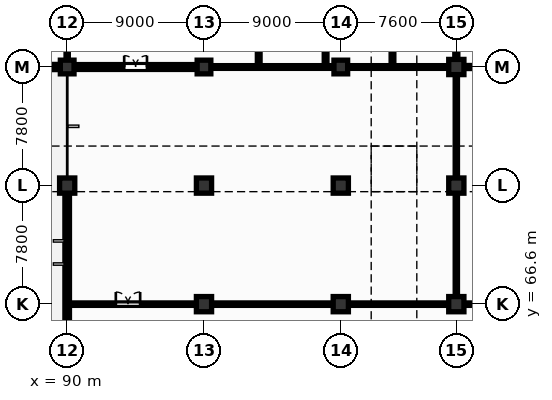
"""IFC4 building model, lengths in metres.
Left out: names, types, materials, properties, quantities, classifications, styles, units other than length and angle.
Written with IfcOpenShell. Run it as: python <this file> out.ifc"""

import sys

from ifc_helpers import new_model, si_unit, direction, frame, frame_2d, origin, origin_2d, place, context, subcontext, project, spatial, rectangle, extrude, element, fill, save


model = new_model("IFC4")
c1 = context("Model", 3, precision=1e-05, world=origin(), true_north=direction((0.0, 1.0)))
c2 = subcontext(c1, "Body", "Model", "MODEL_VIEW")
j1 = project(units=[si_unit("LENGTHUNIT", "METRE"), si_unit("PLANEANGLEUNIT", "RADIAN")], contexts=[c1])
p1 = place(None, origin())
s1 = spatial("IfcSite", under=j1, at=p1, CompositionType="ELEMENT")
p2 = place(p1, origin())
s2 = spatial("IfcBuilding", under=s1, at=p2, CompositionType="ELEMENT")
p3 = place(p2, origin())
s3 = spatial("IfcBuildingStorey", under=s2, at=p3, CompositionType="ELEMENT", Elevation=0.0)
p4 = place(p3, frame((90.0, 74.4, 0.0), z_axis=(0.0, 0.0, 1.0), x_axis=(1.0, 0.0, 0.0)))
e1 = element("IfcColumn", 1, at=p4, inside=s3, PredefinedType="COLUMN", context=c2, shape_type="SweptSolid", body=[
    extrude(rectangle(XDim=1.0, YDim=1.0, at=origin_2d()), origin(), (0.0, 0.0, 1.0), 5.1),
])
p5 = place(p3, frame((90.0, 82.2, 0.0), z_axis=(0.0, 0.0, 1.0), x_axis=(1.0, 0.0, 0.0)))
e2 = element("IfcColumn", 2, at=p5, inside=s3, PredefinedType="COLUMN", context=c2, shape_type="SweptSolid", body=[
    extrude(rectangle(XDim=0.9, YDim=0.9, at=origin_2d()), origin(), (0.0, 0.0, 1.0), 5.1),
])
for number, where, z_axis, x_axis in (
    (3, (99.0, 66.6, 0.0), (0.0, 0.0, 1.0), (1.0, 0.0, 0.0)),
    (4, (99.0, 74.4, 0.0), (0.0, 0.0, 1.0), (1.0, 0.0, 0.0)),
):
    element("IfcColumn", number, at=place(p3, frame(where, z_axis=z_axis, x_axis=x_axis)), inside=s3, PredefinedType="COLUMN", context=c2, shape_type="SweptSolid", body=[
        extrude(rectangle(XDim=1.0, YDim=1.0, at=origin_2d()), origin(), (0.0, 0.0, 1.0), 5.1),
    ])
p6 = place(p3, frame((99.0, 82.2, 0.0), z_axis=(0.0, 0.0, 1.0), x_axis=(1.0, 0.0, 0.0)))
e5 = element("IfcColumn", 5, at=p6, inside=s3, PredefinedType="COLUMN", context=c2, shape_type="SweptSolid", body=[
    extrude(rectangle(XDim=0.9, YDim=0.9, at=origin_2d()), origin(), (0.0, 0.0, 1.0), 5.1),
])
for number, where, z_axis, x_axis in (
    (6, (108.0, 66.6, 0.0), (0.0, 0.0, 1.0), (1.0, 0.0, 0.0)),
    (7, (108.0, 74.4, 0.0), (0.0, 0.0, 1.0), (1.0, 0.0, 0.0)),
):
    element("IfcColumn", number, at=place(p3, frame(where, z_axis=z_axis, x_axis=x_axis)), inside=s3, PredefinedType="COLUMN", context=c2, shape_type="SweptSolid", body=[
        extrude(rectangle(XDim=1.0, YDim=1.0, at=origin_2d()), origin(), (0.0, 0.0, 1.0), 5.1),
    ])
p7 = place(p3, frame((108.0, 82.2, 0.0), z_axis=(0.0, 0.0, 1.0), x_axis=(1.0, 0.0, 0.0)))
e8 = element("IfcColumn", 8, at=p7, inside=s3, PredefinedType="COLUMN", context=c2, shape_type="SweptSolid", body=[
    extrude(rectangle(XDim=0.9, YDim=0.9, at=origin_2d()), origin(), (0.0, 0.0, 1.0), 5.1),
])
for number, where, z_axis, x_axis in (
    (9, (115.6, 66.6, 0.0), (0.0, 0.0, 1.0), (1.0, 0.0, 0.0)),
    (10, (115.6, 74.4, 0.0), (0.0, 0.0, 1.0), (1.0, 0.0, 0.0)),
    (11, (115.6, 82.2, 0.0), (0.0, 0.0, 1.0), (1.0, 0.0, 0.0)),
):
    element("IfcColumn", number, at=place(p3, frame(where, z_axis=z_axis, x_axis=x_axis)), inside=s3, PredefinedType="COLUMN", context=c2, shape_type="SweptSolid", body=[
        extrude(rectangle(XDim=1.0, YDim=1.0, at=origin_2d()), origin(), (0.0, 0.0, 1.0), 5.1),
    ])
p8 = place(p3, frame((81.0, 82.2, 0.0), z_axis=(0.0, 0.0, 1.0), x_axis=(1.0, 0.0, 0.0)))
e12 = element("IfcWall", 12, at=p8, inside=s3, PredefinedType="SOLIDWALL", context=c2, shape_type="SweptSolid", body=[
    extrude(rectangle(XDim=9.0, YDim=0.34, at=frame_2d((4.5, 0.0))), origin(), (0.0, 0.0, 1.0), 4.8),
])
p9 = place(p8, frame((1.8, 0.0, 0.85)))
e13 = element("IfcOpeningElement", 13, at=p9, cuts=e12, PredefinedType="OPENING", context=c2, shape_type="SweptSolid", body=[
    extrude(rectangle(XDim=1.5, YDim=2.1, at=frame_2d((0.75, 1.05))), frame((0.0, 0.18, 0.0), z_axis=(0.0, -1.0, 0.0), x_axis=(1.0, 0.0, 0.0)), (0.0, 0.0, 1.0), 0.36),
])
p10 = place(p8, frame((5.4, 0.0, 0.85)))
e14 = element("IfcOpeningElement", 14, at=p10, cuts=e12, PredefinedType="OPENING", context=c2, shape_type="SweptSolid", body=[
    extrude(rectangle(XDim=1.2, YDim=2.1, at=frame_2d((0.6, 1.05))), frame((0.0, 0.18, 0.0), z_axis=(0.0, -1.0, 0.0), x_axis=(1.0, 0.0, 0.0)), (0.0, 0.0, 1.0), 0.36),
])
p11 = place(p3, frame((90.0, 43.2, 0.0), z_axis=(0.0, 0.0, 1.0), x_axis=(0.0, 1.0, 0.0)))
e15 = element("IfcWall", 15, at=p11, inside=s3, PredefinedType="SOLIDWALL", context=c2, shape_type="SweptSolid", body=[
    extrude(rectangle(XDim=31.2, YDim=0.3, at=frame_2d((15.6, 0.0))), origin(), (0.0, 0.0, 1.0), 5.25),
])
p12 = place(p11, frame((3.5, 0.0, 0.9)))
e16 = element("IfcOpeningElement", 16, at=p12, cuts=e15, PredefinedType="OPENING", context=c2, shape_type="SweptSolid", body=[
    extrude(rectangle(XDim=1.6, YDim=2.05, at=frame_2d((0.8, 1.025))), frame((0.0, 0.16, 0.0), z_axis=(0.0, -1.0, 0.0), x_axis=(1.0, 0.0, 0.0)), (0.0, 0.0, 1.0), 0.32),
])
p13 = place(p11, frame((11.5, 0.0, 0.9)))
e17 = element("IfcOpeningElement", 17, at=p13, cuts=e15, PredefinedType="OPENING", context=c2, shape_type="SweptSolid", body=[
    extrude(rectangle(XDim=1.8, YDim=2.1, at=frame_2d((0.9, 1.05))), frame((0.0, 0.16, 0.0), z_axis=(0.0, -1.0, 0.0), x_axis=(1.0, 0.0, 0.0)), (0.0, 0.0, 1.0), 0.32),
])
p14 = place(p11, frame((19.5, 0.0, 0.9)))
e18 = element("IfcOpeningElement", 18, at=p14, cuts=e15, PredefinedType="OPENING", context=c2, shape_type="SweptSolid", body=[
    extrude(rectangle(XDim=1.6, YDim=2.05, at=frame_2d((0.8, 1.025))), frame((0.0, 0.16, 0.0), z_axis=(0.0, -1.0, 0.0), x_axis=(1.0, 0.0, 0.0)), (0.0, 0.0, 1.0), 0.32),
])
p15 = place(p11, frame((26.2, 0.0, 0.9)))
e19 = element("IfcOpeningElement", 19, at=p15, cuts=e15, PredefinedType="OPENING", context=c2, shape_type="SweptSolid", body=[
    extrude(rectangle(XDim=1.2, YDim=2.1, at=frame_2d((0.6, 1.05))), frame((0.0, 0.16, 0.0), z_axis=(0.0, -1.0, 0.0), x_axis=(1.0, 0.0, 0.0)), (0.0, 0.0, 1.0), 0.32),
])
p16 = place(p3, frame((90.0, 82.2, 0.0), z_axis=(0.0, 0.0, 1.0), x_axis=(1.0, 0.0, 0.0)))
e20 = element("IfcWall", 20, at=p16, inside=s3, PredefinedType="SHEAR", context=c2, shape_type="SweptSolid", body=[
    extrude(rectangle(XDim=9.0, YDim=0.32, at=frame_2d((4.5, 0.0))), origin(), (0.0, 0.0, 1.0), 4.8),
])
p17 = place(p16, frame((3.75, 0.0, 0.0)))
e21 = element("IfcOpeningElement", 21, at=p17, cuts=e20, PredefinedType="OPENING", context=c2, shape_type="SweptSolid", body=[
    extrude(rectangle(XDim=1.5, YDim=2.2, at=frame_2d((0.75, 1.1))), frame((0.0, 0.17, 0.0), z_axis=(0.0, -1.0, 0.0), x_axis=(1.0, 0.0, 0.0)), (0.0, 0.0, 1.0), 0.34),
])
p18 = place(p3, frame((90.0, 82.2, 0.0), z_axis=(0.0, 0.0, 1.0), x_axis=(0.0, 1.0, 0.0)))
e22 = element("IfcWall", 22, at=p18, inside=s3, PredefinedType="PARTITIONING", context=c2, shape_type="SweptSolid", body=[
    extrude(rectangle(XDim=13.4, YDim=0.15, at=frame_2d((6.7, 0.0))), origin(), (0.0, 0.0, 1.0), 4.095),
])
for number, where, z_axis, x_axis in (
    (23, (102.6, 82.2, 0.0), (0.0, 0.0, 1.0), (0.0, 1.0, 0.0)),
    (24, (107.0, 82.2, 0.0), (0.0, 0.0, 1.0), (0.0, 1.0, 0.0)),
    (25, (111.4, 82.2, 0.0), (0.0, 0.0, 1.0), (0.0, 1.0, 0.0)),
):
    element("IfcWall", number, at=place(p3, frame(where, z_axis=z_axis, x_axis=x_axis)), inside=s3, PredefinedType="PLUMBINGWALL", context=c2, shape_type="SweptSolid", body=[
        extrude(rectangle(XDim=13.4, YDim=0.18, at=frame_2d((6.7, 0.0))), origin(), (0.0, 0.0, 1.0), 4.8),
    ])
p19 = place(p3, frame((115.6, 82.2, 0.0), z_axis=(0.0, 0.0, 1.0), x_axis=(0.0, 1.0, 0.0)))
e26 = element("IfcWall", 26, at=p19, inside=s3, PredefinedType="PARTITIONING", context=c2, shape_type="SweptSolid", body=[
    extrude(rectangle(XDim=31.8, YDim=0.2, at=frame_2d((15.9, 0.0))), origin(), (0.0, 0.0, 1.0), 4.045),
])
p20 = place(p19, frame((18.0, 0.0, 0.0)))
e27 = element("IfcOpeningElement", 27, at=p20, cuts=e26, PredefinedType="OPENING", context=c2, shape_type="SweptSolid", body=[
    extrude(rectangle(XDim=1.6, YDim=2.2, at=frame_2d((0.8, 1.1))), frame((0.0, 0.11, 0.0), z_axis=(0.0, -1.0, 0.0), x_axis=(1.0, 0.0, 0.0)), (0.0, 0.0, 1.0), 0.22),
])
p21 = place(p3, frame((90.0, 66.6, 0.0), z_axis=(0.0, 0.0, 1.0), x_axis=(1.0, 0.0, 0.0)))
e28 = element("IfcWall", 28, at=p21, inside=s3, PredefinedType="PARTITIONING", context=c2, shape_type="SweptSolid", body=[
    extrude(rectangle(XDim=25.6, YDim=0.16, at=frame_2d((12.8, 0.0))), origin(), (0.0, 0.0, 1.0), 4.153),
])
p22 = place(p21, frame((3.2, 0.0, 0.0)))
e29 = element("IfcOpeningElement", 29, at=p22, cuts=e28, PredefinedType="OPENING", context=c2, shape_type="SweptSolid", body=[
    extrude(rectangle(XDim=1.6, YDim=2.2, at=frame_2d((0.8, 1.1))), frame((0.0, 0.09, 0.0), z_axis=(0.0, -1.0, 0.0), x_axis=(1.0, 0.0, 0.0)), (0.0, 0.0, 1.0), 0.18),
])
p23 = place(p3, frame((115.6, 66.6, 0.0), z_axis=(0.0, 0.0, 1.0), x_axis=(1.0, 0.0, 0.0)))
e30 = element("IfcWall", 30, at=p23, inside=s3, PredefinedType="PARTITIONING", context=c2, shape_type="SweptSolid", body=[
    extrude(rectangle(XDim=22.8, YDim=0.16, at=frame_2d((11.4, 0.0))), origin(), (0.0, 0.0, 1.0), 4.163),
])
p24 = place(p23, frame((3.2, 0.0, 0.0)))
e31 = element("IfcOpeningElement", 31, at=p24, cuts=e30, PredefinedType="OPENING", context=c2, shape_type="SweptSolid", body=[
    extrude(rectangle(XDim=1.6, YDim=2.2, at=frame_2d((0.8, 1.1))), frame((0.0, 0.09, 0.0), z_axis=(0.0, -1.0, 0.0), x_axis=(1.0, 0.0, 0.0)), (0.0, 0.0, 1.0), 0.18),
])
p25 = place(p3, frame((115.6, 66.6, 0.0), z_axis=(0.0, 0.0, 1.0), x_axis=(0.0, 1.0, 0.0)))
e32 = element("IfcWall", 32, at=p25, inside=s3, PredefinedType="PARTITIONING", context=c2, shape_type="SweptSolid", body=[
    extrude(rectangle(XDim=15.6, YDim=0.15, at=frame_2d((7.8, 0.0))), origin(), (0.0, 0.0, 1.0), 4.163),
])
p26 = place(p3, frame((99.0, 82.2, 0.0), z_axis=(0.0, 0.0, 1.0), x_axis=(1.0, 0.0, 0.0)))
e33 = element("IfcWall", 33, at=p26, inside=s3, PredefinedType="PLUMBINGWALL", context=c2, shape_type="SweptSolid", body=[
    extrude(rectangle(XDim=16.6, YDim=0.18, at=frame_2d((8.3, 0.0))), origin(), (0.0, 0.0, 1.0), 4.153),
])
p27 = place(p3, frame((115.6, 82.2, 0.0), z_axis=(0.0, 0.0, 1.0), x_axis=(1.0, 0.0, 0.0)))
e34 = element("IfcWall", 34, at=p27, inside=s3, PredefinedType="PARTITIONING", context=c2, shape_type="SweptSolid", body=[
    extrude(rectangle(XDim=30.4, YDim=0.2, at=frame_2d((15.2, 0.0))), origin(), (0.0, 0.0, 1.0), 4.308),
])
p28 = place(p27, frame((10.2, 0.0, 0.0)))
e35 = element("IfcOpeningElement", 35, at=p28, cuts=e34, PredefinedType="OPENING", context=c2, shape_type="SweptSolid", body=[
    extrude(rectangle(XDim=1.6, YDim=2.2, at=frame_2d((0.8, 1.1))), frame((0.0, 0.11, 0.0), z_axis=(0.0, -1.0, 0.0), x_axis=(1.0, 0.0, 0.0)), (0.0, 0.0, 1.0), 0.22),
])
p29 = place(p15, origin())
e36 = element("IfcWindow", 36, at=p29, inside=s3, PartitioningType="SINGLE_PANEL", PredefinedType="WINDOW", context=c2, shape_type="SweptSolid", body=[
    extrude(rectangle(XDim=1.2, YDim=2.1, at=frame_2d((0.6, 1.05))), frame((0.0, 0.03, 0.0), z_axis=(0.0, -1.0, 0.0), x_axis=(1.0, 0.0, 0.0)), (0.0, 0.0, 1.0), 0.06),
])
fill(e19, e36)
p30 = place(p17, origin())
e37 = element("IfcDoor", 37, at=p30, inside=s3, OperationType="DOUBLE_DOOR_SINGLE_SWING", PredefinedType="DOOR", context=c2, shape_type="SweptSolid", body=[
    extrude(rectangle(XDim=1.5, YDim=2.2, at=frame_2d((0.75, 1.1))), frame((0.0, 0.025, 0.0), z_axis=(0.0, -1.0, 0.0), x_axis=(1.0, 0.0, 0.0)), (0.0, 0.0, 1.0), 0.05),
])
fill(e21, e37)
p31 = place(p22, origin())
e38 = element("IfcDoor", 38, at=p31, inside=s3, OperationType="DOUBLE_DOOR_SINGLE_SWING", PredefinedType="DOOR", context=c2, shape_type="SweptSolid", body=[
    extrude(rectangle(XDim=1.6, YDim=2.2, at=frame_2d((0.8, 1.1))), frame((0.0, 0.025, 0.0), z_axis=(0.0, -1.0, 0.0), x_axis=(1.0, 0.0, 0.0)), (0.0, 0.0, 1.0), 0.05),
])
fill(e29, e38)
save(model, sys.argv[1])
